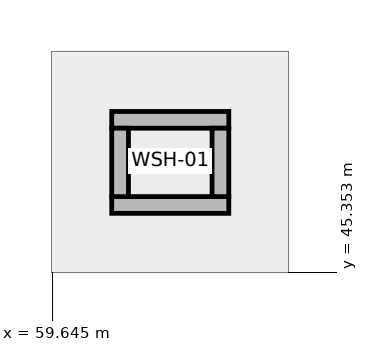
"""IFC4 building model, lengths in metres.
Left out: names, types, materials, properties, quantities, classifications, styles, units other than length and angle.
Written with IfcOpenShell. Run it as: python <this file> out.ifc"""

import sys

from ifc_helpers import new_model, si_unit, direction, frame, frame_2d, origin, place, context, subcontext, project, spatial, rectangle, extrude, element, save


model = new_model("IFC4")
c1 = context("Model", 3, precision=1e-05, world=origin(), true_north=direction((0.0, 1.0)))
c2 = subcontext(c1, "Body", "Model", "MODEL_VIEW")
j1 = project(units=[si_unit("LENGTHUNIT", "METRE"), si_unit("PLANEANGLEUNIT", "RADIAN")], contexts=[c1])
p1 = place(None, origin())
s1 = spatial("IfcSite", under=j1, at=p1, CompositionType="ELEMENT")
p2 = place(p1, origin())
s2 = spatial("IfcBuilding", under=s1, at=p2, CompositionType="ELEMENT")
p3 = place(p2, frame((0.0, 0.0, -4.5)))
s3 = spatial("IfcBuildingStorey", under=s2, at=p3, CompositionType="ELEMENT", Elevation=-4.5)
for number, where, z_axis, x_axis in (
    (1, (60.43, 46.24, 0.0), (0.0, 0.0, 1.0), (1.0, 0.0, 0.0)),
    (2, (60.43, 47.36, 0.0), (0.0, 0.0, 1.0), (1.0, 0.0, 0.0)),
):
    element("IfcWall", number, at=place(p3, frame(where, z_axis=z_axis, x_axis=x_axis)), inside=s3, PredefinedType="STANDARD", context=c2, shape_type="SweptSolid", body=[
        extrude(rectangle(XDim=1.54, YDim=0.22, at=frame_2d((0.77, 0.0))), origin(), (0.0, 0.0, 1.0), 3.19),
    ])
for number, where, z_axis, x_axis in (
    (3, (60.54, 46.35, 0.0), (0.0, 0.0, 1.0), (0.0, 1.0, 0.0)),
    (4, (61.86, 46.35, 0.0), (0.0, 0.0, 1.0), (0.0, 1.0, 0.0)),
):
    element("IfcWall", number, at=place(p3, frame(where, z_axis=z_axis, x_axis=x_axis)), inside=s3, PredefinedType="STANDARD", context=c2, shape_type="SweptSolid", body=[
        extrude(rectangle(XDim=0.9, YDim=0.22, at=frame_2d((0.45, 0.0))), origin(), (0.0, 0.0, 1.0), 3.19),
    ])
save(model, sys.argv[1])
